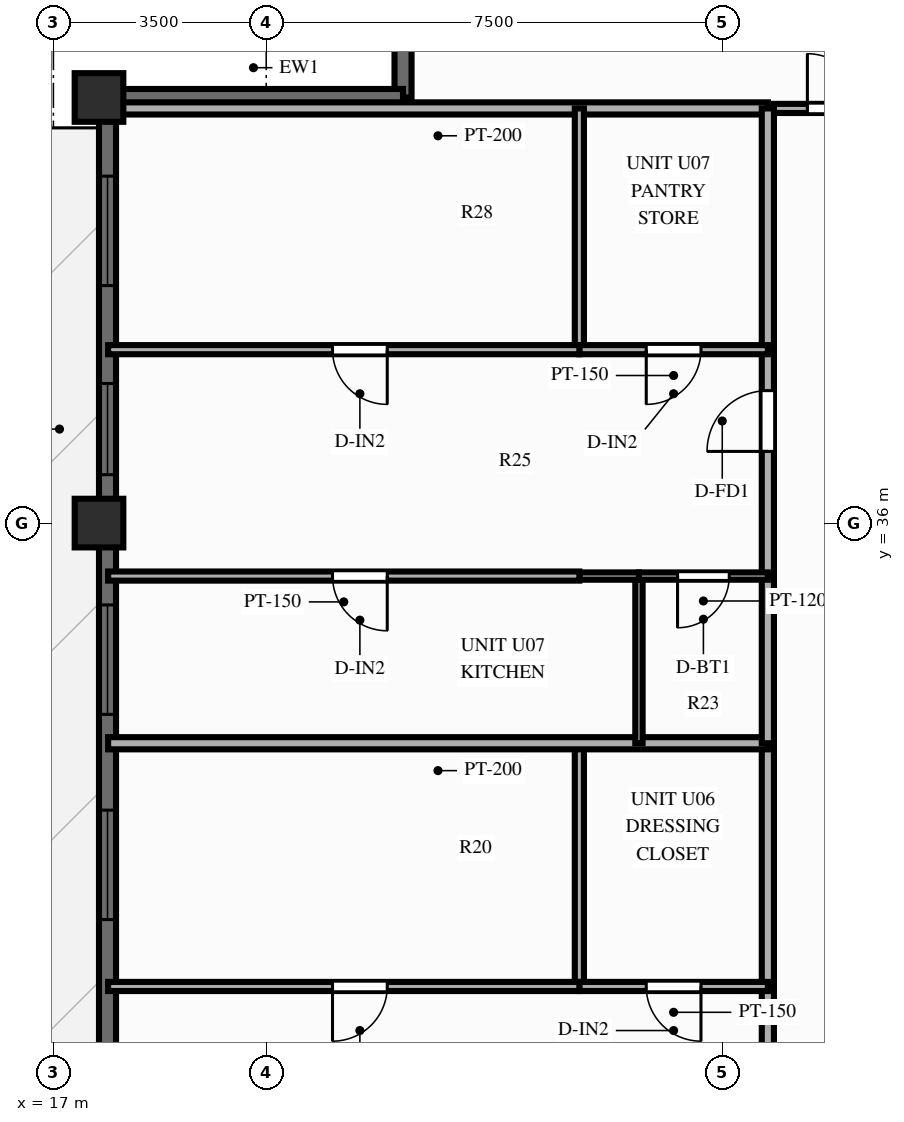
"""IFC4 building model, lengths in metres.
Left out: names, types, materials, properties, quantities, classifications, styles, units other than length and angle.
Written with IfcOpenShell. Run it as: python <this file> out.ifc"""

import sys

from ifc_helpers import new_model, si_unit, direction, frame, frame_2d, origin, origin_2d, place, context, subcontext, project, spatial, rectangle, extrude, source, transform, mapped, element, fill, save


model = new_model("IFC4")
c1 = context("Model", 3, precision=1e-05, world=origin(), true_north=direction((0.0, 1.0)))
c2 = subcontext(c1, "Body", "Model", "MODEL_VIEW")
j1 = project(units=[si_unit("LENGTHUNIT", "METRE"), si_unit("PLANEANGLEUNIT", "RADIAN")], contexts=[c1])
p1 = place(None, origin())
s1 = spatial("IfcSite", under=j1, at=p1, CompositionType="ELEMENT")
p2 = place(p1, origin())
s2 = spatial("IfcBuilding", under=s1, at=p2, CompositionType="ELEMENT")
p3 = place(p2, frame((0.0, 0.0, 172.9)))
s3 = spatial("IfcBuildingStorey", under=s2, at=p3, CompositionType="ELEMENT", Elevation=172.9)
m1 = source(origin(), c2, "Body", "SweptSolid", [
    extrude(rectangle(XDim=0.8, YDim=0.8, at=origin_2d()), origin(), (0.0, 0.0, 1.0), 3.9),
])
for number, where, z_axis, x_axis in (
    (1, (17.75, 43.0, 0.0), (0.0, 0.0, 1.0), (1.0, 0.0, 0.0)),
    (2, (17.75, 36.0, 0.0), (0.0, 0.0, 1.0), (1.0, 0.0, 0.0)),
):
    element("IfcColumn", number, at=place(p3, frame(where, z_axis=z_axis, x_axis=x_axis)), inside=s3, PredefinedType="COLUMN", context=c2, shape_type="MappedRepresentation", body=[
        mapped(m1, transform((0.0, 0.0, 0.0), scale=1.0)),
    ])
p4 = place(p3, frame((17.89, 11.0, 0.0), z_axis=(0.0, 0.0, 1.0), x_axis=(0.0, 1.0, 0.0)))
e3 = element("IfcWall", 3, at=p4, inside=s3, PredefinedType="SOLIDWALL", context=c2, shape_type="SweptSolid", body=[
    extrude(rectangle(XDim=32.0, YDim=0.28, at=frame_2d((16.0, 0.0))), origin(), (0.0, 0.0, 1.0), 2.79),
])
p5 = place(p4, frame((0.685, 0.0, 0.85)))
e4 = element("IfcOpeningElement", 4, at=p5, cuts=e3, PredefinedType="OPENING", context=c2, shape_type="SweptSolid", body=[
    extrude(rectangle(XDim=1.8, YDim=1.65, at=frame_2d((0.9, 0.825))), frame((0.0, 0.152, 0.0), z_axis=(0.0, -1.0, 0.0), x_axis=(1.0, 0.0, 0.0)), (0.0, 0.0, 1.0), 0.304),
])
p6 = place(p4, frame((3.945, 0.0, 0.85)))
e5 = element("IfcOpeningElement", 5, at=p6, cuts=e3, PredefinedType="OPENING", context=c2, shape_type="SweptSolid", body=[
    extrude(rectangle(XDim=1.8, YDim=1.65, at=frame_2d((0.9, 0.825))), frame((0.0, 0.152, 0.0), z_axis=(0.0, -1.0, 0.0), x_axis=(1.0, 0.0, 0.0)), (0.0, 0.0, 1.0), 0.304),
])
p7 = place(p4, frame((8.051, 0.0, 0.85)))
e6 = element("IfcOpeningElement", 6, at=p7, cuts=e3, PredefinedType="OPENING", context=c2, shape_type="SweptSolid", body=[
    extrude(rectangle(XDim=1.8, YDim=1.65, at=frame_2d((0.9, 0.825))), frame((0.0, 0.152, 0.0), z_axis=(0.0, -1.0, 0.0), x_axis=(1.0, 0.0, 0.0)), (0.0, 0.0, 1.0), 0.304),
])
p8 = place(p4, frame((11.096, 0.0, 0.85)))
e7 = element("IfcOpeningElement", 7, at=p8, cuts=e3, PredefinedType="OPENING", context=c2, shape_type="SweptSolid", body=[
    extrude(rectangle(XDim=1.8, YDim=1.65, at=frame_2d((0.9, 0.825))), frame((0.0, 0.152, 0.0), z_axis=(0.0, -1.0, 0.0), x_axis=(1.0, 0.0, 0.0)), (0.0, 0.0, 1.0), 0.304),
])
p9 = place(p4, frame((14.575, 0.0, 0.0)))
e8 = element("IfcOpeningElement", 8, at=p9, cuts=e3, PredefinedType="OPENING", context=c2, shape_type="SweptSolid", body=[
    extrude(rectangle(XDim=1.6, YDim=2.15, at=frame_2d((0.8, 1.075))), frame((0.0, 0.152, 0.0), z_axis=(0.0, -1.0, 0.0), x_axis=(1.0, 0.0, 0.0)), (0.0, 0.0, 1.0), 0.304),
])
p10 = place(p4, frame((18.479, 0.0, 0.85)))
e9 = element("IfcOpeningElement", 9, at=p10, cuts=e3, PredefinedType="OPENING", context=c2, shape_type="SweptSolid", body=[
    extrude(rectangle(XDim=1.8, YDim=1.65, at=frame_2d((0.9, 0.825))), frame((0.0, 0.152, 0.0), z_axis=(0.0, -1.0, 0.0), x_axis=(1.0, 0.0, 0.0)), (0.0, 0.0, 1.0), 0.304),
])
p11 = place(p4, frame((21.854, 0.0, 0.85)))
e10 = element("IfcOpeningElement", 10, at=p11, cuts=e3, PredefinedType="OPENING", context=c2, shape_type="SweptSolid", body=[
    extrude(rectangle(XDim=1.8, YDim=1.65, at=frame_2d((0.9, 0.825))), frame((0.0, 0.152, 0.0), z_axis=(0.0, -1.0, 0.0), x_axis=(1.0, 0.0, 0.0)), (0.0, 0.0, 1.0), 0.304),
])
p12 = place(p4, frame((25.796, 0.0, 0.85)))
e11 = element("IfcOpeningElement", 11, at=p12, cuts=e3, PredefinedType="OPENING", context=c2, shape_type="SweptSolid", body=[
    extrude(rectangle(XDim=1.5, YDim=1.65, at=frame_2d((0.75, 0.825))), frame((0.0, 0.152, 0.0), z_axis=(0.0, -1.0, 0.0), x_axis=(1.0, 0.0, 0.0)), (0.0, 0.0, 1.0), 0.304),
])
p13 = place(p4, frame((28.906, 0.0, 0.85)))
e12 = element("IfcOpeningElement", 12, at=p13, cuts=e3, PredefinedType="OPENING", context=c2, shape_type="SweptSolid", body=[
    extrude(rectangle(XDim=1.8, YDim=1.65, at=frame_2d((0.9, 0.825))), frame((0.0, 0.152, 0.0), z_axis=(0.0, -1.0, 0.0), x_axis=(1.0, 0.0, 0.0)), (0.0, 0.0, 1.0), 0.304),
])
for number, where, z_axis, x_axis in (
    (13, (22.75, 43.0, 0.0), (0.0, 0.0, 1.0), (0.0, 1.0, 0.0)),
    (14, (17.83, 43.0, 0.0), (0.0, 0.0, 1.0), (1.0, 0.0, 0.0)),
):
    element("IfcWall", number, at=place(p3, frame(where, z_axis=z_axis, x_axis=x_axis)), inside=s3, PredefinedType="SOLIDWALL", context=c2, shape_type="SweptSolid", body=[
        extrude(rectangle(XDim=4.92, YDim=0.28, at=frame_2d((2.46, 0.0))), origin(), (0.0, 0.0, 1.0), 2.79),
    ])
p14 = place(p3, frame((28.85, 42.82, 0.0), z_axis=(0.0, 0.0, 1.0), x_axis=(1.0, 0.0, 0.0)))
e15 = element("IfcWall", 15, at=p14, inside=s3, PredefinedType="PARTITIONING", context=c2, shape_type="SweptSolid", body=[
    extrude(rectangle(XDim=2.33, YDim=0.15, at=frame_2d((1.165, 0.0))), origin(), (0.0, 0.0, 1.0), 3.69),
])
p15 = place(p14, frame((0.55, 0.0, 0.0)))
e16 = element("IfcOpeningElement", 16, at=p15, cuts=e15, PredefinedType="OPENING", context=c2, shape_type="SweptSolid", body=[
    extrude(rectangle(XDim=0.9, YDim=2.1, at=frame_2d((0.45, 1.05))), frame((0.0, 0.087, 0.0), z_axis=(0.0, -1.0, 0.0), x_axis=(1.0, 0.0, 0.0)), (0.0, 0.0, 1.0), 0.174),
])
p16 = place(p3, frame((28.75, 42.82, 0.0), z_axis=(0.0, 0.0, 1.0), x_axis=(-1.0, 0.0, 0.0)))
e17 = element("IfcWall", 17, at=p16, inside=s3, PredefinedType="PARTITIONING", context=c2, shape_type="SweptSolid", body=[
    extrude(rectangle(XDim=10.85, YDim=0.2, at=frame_2d((5.425, 0.0))), origin(), (0.0, 0.0, 1.0), 3.69),
])
p17 = place(p3, frame((28.75, 24.371, 0.0), z_axis=(0.0, 0.0, 1.0), x_axis=(0.0, 1.0, 0.0)))
e18 = element("IfcWall", 18, at=p17, inside=s3, PredefinedType="PARTITIONING", context=c2, shape_type="SweptSolid", body=[
    extrude(rectangle(XDim=4.008, YDim=0.2, at=frame_2d((2.004, 0.0))), origin(), (0.0, 0.0, 1.0), 3.69),
])
p18 = place(p17, frame((1.504, 0.0, 0.0)))
e19 = element("IfcOpeningElement", 19, at=p18, cuts=e18, PredefinedType="OPENING", context=c2, shape_type="SweptSolid", body=[
    extrude(rectangle(XDim=1.0, YDim=2.15, at=frame_2d((0.5, 1.075))), frame((0.0, 0.112, 0.0), z_axis=(0.0, -1.0, 0.0), x_axis=(1.0, 0.0, 0.0)), (0.0, 0.0, 1.0), 0.224),
])
p19 = place(p3, frame((28.75, 28.379, 0.0), z_axis=(0.0, 0.0, 1.0), x_axis=(0.0, 1.0, 0.0)))
e20 = element("IfcWall", 20, at=p19, inside=s3, PredefinedType="PARTITIONING", context=c2, shape_type="SweptSolid", body=[
    extrude(rectangle(XDim=4.0, YDim=0.2, at=frame_2d((2.0, 0.0))), origin(), (0.0, 0.0, 1.0), 3.69),
])
p20 = place(p3, frame((25.65, 28.379, 0.0), z_axis=(0.0, 0.0, 1.0), x_axis=(0.0, 1.0, 0.0)))
e21 = element("IfcWall", 21, at=p20, inside=s3, PredefinedType="PARTITIONING", context=c2, shape_type="SweptSolid", body=[
    extrude(rectangle(XDim=4.0, YDim=0.15, at=frame_2d((2.0, 0.0))), origin(), (0.0, 0.0, 1.0), 3.69),
])
p21 = place(p3, frame((28.75, 28.379, 0.0), z_axis=(0.0, 0.0, 1.0), x_axis=(-1.0, 0.0, 0.0)))
e22 = element("IfcWall", 22, at=p21, inside=s3, PredefinedType="PARTITIONING", context=c2, shape_type="SweptSolid", body=[
    extrude(rectangle(XDim=3.1, YDim=0.15, at=frame_2d((1.55, 0.0))), origin(), (0.0, 0.0, 1.0), 3.69),
])
p22 = place(p21, frame((1.1, 0.0, 0.0)))
e23 = element("IfcOpeningElement", 23, at=p22, cuts=e22, PredefinedType="OPENING", context=c2, shape_type="SweptSolid", body=[
    extrude(rectangle(XDim=0.9, YDim=2.1, at=frame_2d((0.45, 1.05))), frame((0.0, 0.087, 0.0), z_axis=(0.0, -1.0, 0.0), x_axis=(1.0, 0.0, 0.0)), (0.0, 0.0, 1.0), 0.174),
])
p23 = place(p3, frame((25.65, 28.379, 0.0), z_axis=(0.0, 0.0, 1.0), x_axis=(-1.0, 0.0, 0.0)))
e24 = element("IfcWall", 24, at=p23, inside=s3, PredefinedType="PARTITIONING", context=c2, shape_type="SweptSolid", body=[
    extrude(rectangle(XDim=7.75, YDim=0.15, at=frame_2d((3.875, 0.0))), origin(), (0.0, 0.0, 1.0), 3.69),
])
p24 = place(p23, frame((3.16, 0.0, 0.0)))
e25 = element("IfcOpeningElement", 25, at=p24, cuts=e24, PredefinedType="OPENING", context=c2, shape_type="SweptSolid", body=[
    extrude(rectangle(XDim=0.9, YDim=2.1, at=frame_2d((0.45, 1.05))), frame((0.0, 0.087, 0.0), z_axis=(0.0, -1.0, 0.0), x_axis=(1.0, 0.0, 0.0)), (0.0, 0.0, 1.0), 0.174),
])
p25 = place(p3, frame((28.75, 32.379, 0.0), z_axis=(0.0, 0.0, 1.0), x_axis=(-1.0, 0.0, 0.0)))
e26 = element("IfcWall", 26, at=p25, inside=s3, PredefinedType="PARTITIONING", context=c2, shape_type="SweptSolid", body=[
    extrude(rectangle(XDim=10.85, YDim=0.2, at=frame_2d((5.425, 0.0))), origin(), (0.0, 0.0, 1.0), 3.29),
])
p26 = place(p3, frame((28.75, 32.379, 0.0), z_axis=(0.0, 0.0, 1.0), x_axis=(0.0, 1.0, 0.0)))
e27 = element("IfcWall", 27, at=p26, inside=s3, PredefinedType="PARTITIONING", context=c2, shape_type="SweptSolid", body=[
    extrude(rectangle(XDim=2.75, YDim=0.2, at=frame_2d((1.375, 0.0))), origin(), (0.0, 0.0, 1.0), 3.69),
])
p27 = place(p3, frame((28.75, 35.129, 0.0), z_axis=(0.0, 0.0, 1.0), x_axis=(0.0, 1.0, 0.0)))
e28 = element("IfcWall", 28, at=p27, inside=s3, PredefinedType="PARTITIONING", context=c2, shape_type="SweptSolid", body=[
    extrude(rectangle(XDim=3.723, YDim=0.2, at=frame_2d((1.862, 0.0))), origin(), (0.0, 0.0, 1.0), 3.69),
])
p28 = place(p27, frame((2.05, 0.0, 0.0)))
e29 = element("IfcOpeningElement", 29, at=p28, cuts=e28, PredefinedType="OPENING", context=c2, shape_type="SweptSolid", body=[
    extrude(rectangle(XDim=1.0, YDim=2.15, at=frame_2d((0.5, 1.075))), frame((0.0, 0.112, 0.0), z_axis=(0.0, -1.0, 0.0), x_axis=(1.0, 0.0, 0.0)), (0.0, 0.0, 1.0), 0.224),
])
p29 = place(p3, frame((28.75, 38.852, 0.0), z_axis=(0.0, 0.0, 1.0), x_axis=(0.0, 1.0, 0.0)))
e30 = element("IfcWall", 30, at=p29, inside=s3, PredefinedType="PARTITIONING", context=c2, shape_type="SweptSolid", body=[
    extrude(rectangle(XDim=3.968, YDim=0.2, at=frame_2d((1.984, 0.0))), origin(), (0.0, 0.0, 1.0), 3.69),
])
p30 = place(p3, frame((26.63, 32.379, 0.0), z_axis=(0.0, 0.0, 1.0), x_axis=(0.0, 1.0, 0.0)))
e31 = element("IfcWall", 31, at=p30, inside=s3, PredefinedType="PARTITIONING", context=c2, shape_type="SweptSolid", body=[
    extrude(rectangle(XDim=2.75, YDim=0.12, at=frame_2d((1.375, 0.0))), origin(), (0.0, 0.0, 1.0), 3.69),
])
p31 = place(p3, frame((25.65, 38.852, 0.0), z_axis=(0.0, 0.0, 1.0), x_axis=(0.0, 1.0, 0.0)))
e32 = element("IfcWall", 32, at=p31, inside=s3, PredefinedType="PARTITIONING", context=c2, shape_type="SweptSolid", body=[
    extrude(rectangle(XDim=3.968, YDim=0.15, at=frame_2d((1.984, 0.0))), origin(), (0.0, 0.0, 1.0), 3.69),
])
p32 = place(p3, frame((28.75, 35.129, 0.0), z_axis=(0.0, 0.0, 1.0), x_axis=(-1.0, 0.0, 0.0)))
e33 = element("IfcWall", 33, at=p32, inside=s3, PredefinedType="PARTITIONING", context=c2, shape_type="SweptSolid", body=[
    extrude(rectangle(XDim=2.12, YDim=0.12, at=frame_2d((1.06, 0.0))), origin(), (0.0, 0.0, 1.0), 3.69),
])
p33 = place(p32, frame((0.635, 0.0, 0.0)))
e34 = element("IfcOpeningElement", 34, at=p33, cuts=e33, PredefinedType="OPENING", context=c2, shape_type="SweptSolid", body=[
    extrude(rectangle(XDim=0.85, YDim=2.05, at=frame_2d((0.425, 1.025))), frame((0.0, 0.072, 0.0), z_axis=(0.0, -1.0, 0.0), x_axis=(1.0, 0.0, 0.0)), (0.0, 0.0, 1.0), 0.144),
])
p34 = place(p3, frame((26.63, 35.129, 0.0), z_axis=(0.0, 0.0, 1.0), x_axis=(-1.0, 0.0, 0.0)))
e35 = element("IfcWall", 35, at=p34, inside=s3, PredefinedType="PARTITIONING", context=c2, shape_type="SweptSolid", body=[
    extrude(rectangle(XDim=0.98, YDim=0.12, at=frame_2d((0.49, 0.0))), origin(), (0.0, 0.0, 1.0), 3.69),
])
p35 = place(p3, frame((25.65, 35.129, 0.0), z_axis=(0.0, 0.0, 1.0), x_axis=(-1.0, 0.0, 0.0)))
e36 = element("IfcWall", 36, at=p35, inside=s3, PredefinedType="PARTITIONING", context=c2, shape_type="SweptSolid", body=[
    extrude(rectangle(XDim=7.75, YDim=0.15, at=frame_2d((3.875, 0.0))), origin(), (0.0, 0.0, 1.0), 3.69),
])
p36 = place(p35, frame((3.16, 0.0, 0.0)))
e37 = element("IfcOpeningElement", 37, at=p36, cuts=e36, PredefinedType="OPENING", context=c2, shape_type="SweptSolid", body=[
    extrude(rectangle(XDim=0.9, YDim=2.1, at=frame_2d((0.45, 1.05))), frame((0.0, 0.087, 0.0), z_axis=(0.0, -1.0, 0.0), x_axis=(1.0, 0.0, 0.0)), (0.0, 0.0, 1.0), 0.174),
])
p37 = place(p3, frame((28.75, 38.852, 0.0), z_axis=(0.0, 0.0, 1.0), x_axis=(-1.0, 0.0, 0.0)))
e38 = element("IfcWall", 38, at=p37, inside=s3, PredefinedType="PARTITIONING", context=c2, shape_type="SweptSolid", body=[
    extrude(rectangle(XDim=3.1, YDim=0.15, at=frame_2d((1.55, 0.0))), origin(), (0.0, 0.0, 1.0), 3.69),
])
p38 = place(p37, frame((1.1, 0.0, 0.0)))
e39 = element("IfcOpeningElement", 39, at=p38, cuts=e38, PredefinedType="OPENING", context=c2, shape_type="SweptSolid", body=[
    extrude(rectangle(XDim=0.9, YDim=2.1, at=frame_2d((0.45, 1.05))), frame((0.0, 0.087, 0.0), z_axis=(0.0, -1.0, 0.0), x_axis=(1.0, 0.0, 0.0)), (0.0, 0.0, 1.0), 0.174),
])
p39 = place(p3, frame((25.65, 38.852, 0.0), z_axis=(0.0, 0.0, 1.0), x_axis=(-1.0, 0.0, 0.0)))
e40 = element("IfcWall", 40, at=p39, inside=s3, PredefinedType="PARTITIONING", context=c2, shape_type="SweptSolid", body=[
    extrude(rectangle(XDim=7.75, YDim=0.15, at=frame_2d((3.875, 0.0))), origin(), (0.0, 0.0, 1.0), 3.69),
])
p40 = place(p39, frame((3.16, 0.0, 0.0)))
e41 = element("IfcOpeningElement", 41, at=p40, cuts=e40, PredefinedType="OPENING", context=c2, shape_type="SweptSolid", body=[
    extrude(rectangle(XDim=0.9, YDim=2.1, at=frame_2d((0.45, 1.05))), frame((0.0, 0.087, 0.0), z_axis=(0.0, -1.0, 0.0), x_axis=(1.0, 0.0, 0.0)), (0.0, 0.0, 1.0), 0.174),
])
m2 = source(origin(), c2, "Body", "SweptSolid", [
    extrude(rectangle(XDim=1.8, YDim=1.65, at=frame_2d((0.9, 0.825))), frame((0.0, 0.03, 0.0), z_axis=(0.0, -1.0, 0.0), x_axis=(1.0, 0.0, 0.0)), (0.0, 0.0, 1.0), 0.06),
])
p41 = place(p10, origin())
e42 = element("IfcWindow", 42, at=p41, inside=s3, PartitioningType="SINGLE_PANEL", PredefinedType="WINDOW", context=c2, shape_type="MappedRepresentation", body=[
    mapped(m2, transform((0.0, 0.0, 0.0), scale=1.0)),
])
fill(e9, e42)
p42 = place(p11, origin())
e43 = element("IfcWindow", 43, at=p42, inside=s3, PartitioningType="SINGLE_PANEL", PredefinedType="WINDOW", context=c2, shape_type="MappedRepresentation", body=[
    mapped(m2, transform((0.0, 0.0, 0.0), scale=1.0)),
])
fill(e10, e43)
m3 = source(origin(), c2, "Body", "SweptSolid", [
    extrude(rectangle(XDim=1.5, YDim=1.65, at=frame_2d((0.75, 0.825))), frame((0.0, 0.03, 0.0), z_axis=(0.0, -1.0, 0.0), x_axis=(1.0, 0.0, 0.0)), (0.0, 0.0, 1.0), 0.06),
])
p43 = place(p12, origin())
e44 = element("IfcWindow", 44, at=p43, inside=s3, PartitioningType="SINGLE_PANEL", PredefinedType="WINDOW", context=c2, shape_type="MappedRepresentation", body=[
    mapped(m3, transform((0.0, 0.0, 0.0), scale=1.0)),
])
fill(e11, e44)
p44 = place(p13, origin())
e45 = element("IfcWindow", 45, at=p44, inside=s3, PartitioningType="SINGLE_PANEL", PredefinedType="WINDOW", context=c2, shape_type="MappedRepresentation", body=[
    mapped(m2, transform((0.0, 0.0, 0.0), scale=1.0)),
])
fill(e12, e45)
m4 = source(origin(), c2, "Body", "SweptSolid", [
    extrude(rectangle(XDim=0.9, YDim=2.1, at=frame_2d((0.45, 1.05))), frame((0.0, 0.025, 0.0), z_axis=(0.0, -1.0, 0.0), x_axis=(1.0, 0.0, 0.0)), (0.0, 0.0, 1.0), 0.05),
])
p45 = place(p15, origin())
e46 = element("IfcDoor", 46, at=p45, inside=s3, OperationType="SINGLE_SWING_LEFT", PredefinedType="DOOR", context=c2, shape_type="MappedRepresentation", body=[
    mapped(m4, transform((0.0, 0.0, 0.0), scale=1.0)),
])
fill(e16, e46)
p46 = place(p22, origin())
e47 = element("IfcDoor", 47, at=p46, inside=s3, OperationType="SINGLE_SWING_LEFT", PredefinedType="DOOR", context=c2, shape_type="MappedRepresentation", body=[
    mapped(m4, transform((0.0, 0.0, 0.0), scale=1.0)),
])
fill(e23, e47)
p47 = place(p24, origin())
e48 = element("IfcDoor", 48, at=p47, inside=s3, OperationType="SINGLE_SWING_RIGHT", PredefinedType="DOOR", context=c2, shape_type="MappedRepresentation", body=[
    mapped(m4, transform((0.0, 0.0, 0.0), scale=1.0)),
])
fill(e25, e48)
m5 = source(origin(), c2, "Body", "SweptSolid", [
    extrude(rectangle(XDim=1.0, YDim=2.15, at=frame_2d((0.5, 1.075))), frame((0.0, 0.025, 0.0), z_axis=(0.0, -1.0, 0.0), x_axis=(1.0, 0.0, 0.0)), (0.0, 0.0, 1.0), 0.05),
])
p48 = place(p28, origin())
e49 = element("IfcDoor", 49, at=p48, inside=s3, OperationType="SINGLE_SWING_LEFT", PredefinedType="DOOR", context=c2, shape_type="MappedRepresentation", body=[
    mapped(m5, transform((0.0, 0.0, 0.0), scale=1.0)),
])
fill(e29, e49)
m6 = source(origin(), c2, "Body", "SweptSolid", [
    extrude(rectangle(XDim=0.85, YDim=2.05, at=frame_2d((0.425, 1.025))), frame((0.0, 0.025, 0.0), z_axis=(0.0, -1.0, 0.0), x_axis=(1.0, 0.0, 0.0)), (0.0, 0.0, 1.0), 0.05),
])
p49 = place(p33, origin())
e50 = element("IfcDoor", 50, at=p49, inside=s3, OperationType="SINGLE_SWING_RIGHT", PredefinedType="DOOR", context=c2, shape_type="MappedRepresentation", body=[
    mapped(m6, transform((0.0, 0.0, 0.0), scale=1.0)),
])
fill(e34, e50)
p50 = place(p36, origin())
e51 = element("IfcDoor", 51, at=p50, inside=s3, OperationType="SINGLE_SWING_LEFT", PredefinedType="DOOR", context=c2, shape_type="MappedRepresentation", body=[
    mapped(m4, transform((0.0, 0.0, 0.0), scale=1.0)),
])
fill(e37, e51)
p51 = place(p38, origin())
e52 = element("IfcDoor", 52, at=p51, inside=s3, OperationType="SINGLE_SWING_RIGHT", PredefinedType="DOOR", context=c2, shape_type="MappedRepresentation", body=[
    mapped(m4, transform((0.0, 0.0, 0.0), scale=1.0)),
])
fill(e39, e52)
p52 = place(p40, origin())
e53 = element("IfcDoor", 53, at=p52, inside=s3, OperationType="SINGLE_SWING_LEFT", PredefinedType="DOOR", context=c2, shape_type="MappedRepresentation", body=[
    mapped(m4, transform((0.0, 0.0, 0.0), scale=1.0)),
])
fill(e41, e53)
save(model, sys.argv[1])
